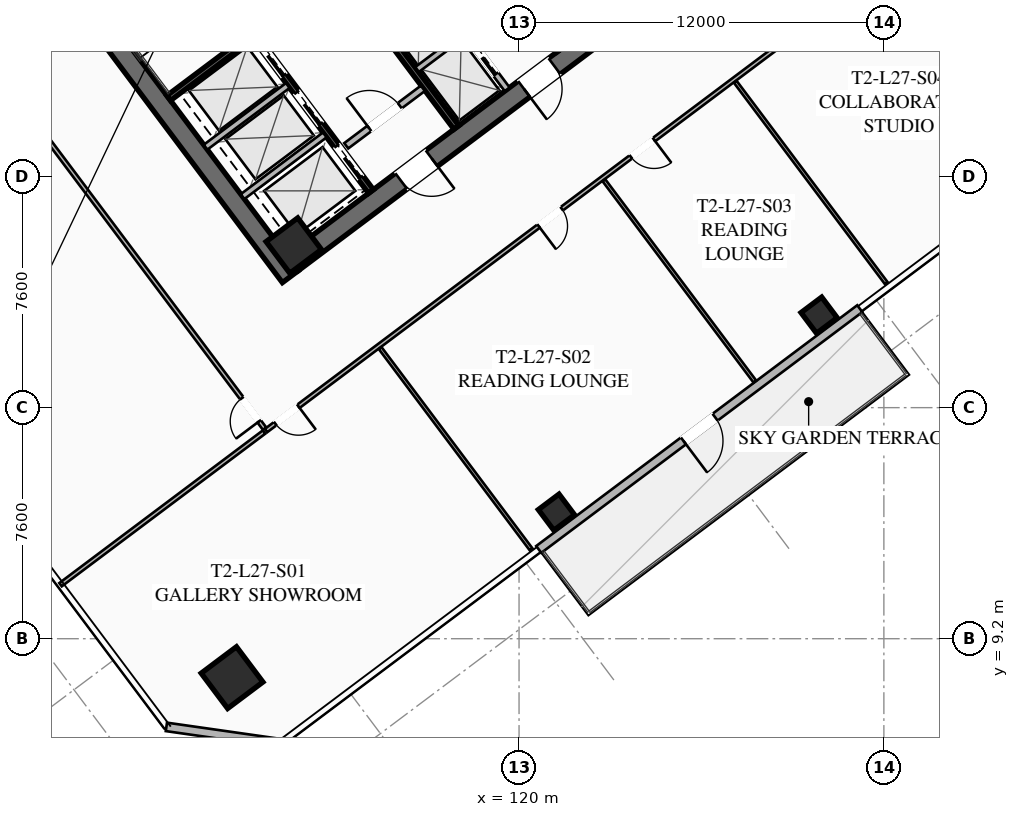
"""IFC4 building model, lengths in metres.
Left out: names, types, materials, properties, quantities, classifications, styles, units other than length and angle.
Written with IfcOpenShell. Run it as: python <this file> out.ifc"""

import sys

from ifc_helpers import new_model, si_unit, direction, frame, frame_2d, origin, origin_2d, place, context, subcontext, project, spatial, rectangle, hollow_rectangle, extrude, element, fill, save


model = new_model("IFC4")
c1 = context("Model", 3, precision=1e-05, world=origin(), true_north=direction((0.0, 1.0)))
c2 = subcontext(c1, "Body", "Model", "MODEL_VIEW")
j1 = project(units=[si_unit("LENGTHUNIT", "METRE"), si_unit("PLANEANGLEUNIT", "RADIAN")], contexts=[c1])
p1 = place(None, origin())
s1 = spatial("IfcSite", under=j1, at=p1, CompositionType="ELEMENT")
p2 = place(p1, origin())
s2 = spatial("IfcBuilding", under=s1, at=p2, CompositionType="ELEMENT")
p3 = place(p2, frame((0.0, 0.0, 102.7)))
s3 = spatial("IfcBuildingStorey", under=s2, at=p3, CompositionType="ELEMENT", Elevation=102.7)
p4 = place(p3, frame((112.476, 21.107, 0.0), z_axis=(0.0, 0.0, 1.0), x_axis=(-0.600005007985, 0.799996243986, 0.0)))
e1 = element("IfcWall", 1, at=p4, inside=s3, PredefinedType="SHEAR", context=c2, shape_type="SweptSolid", body=[
    extrude(rectangle(XDim=15.6, YDim=0.65, at=frame_2d((7.8, 0.0))), origin(), (0.0, 0.0, 1.0), 3.55),
])
p5 = place(p3, frame((124.429, 30.478, 0.0), z_axis=(0.0, 0.0, 1.0), x_axis=(-0.799998028465, -0.600002628705, 0.0)))
e2 = element("IfcWall", 2, at=p5, inside=s3, PredefinedType="SHEAR", context=c2, shape_type="SweptSolid", body=[
    extrude(rectangle(XDim=14.86, YDim=0.65, at=frame_2d((7.43, 0.0))), origin(), (0.0, 0.0, 1.0), 3.55),
])
p6 = place(p5, frame((9.13, 0.0, 0.0)))
e3 = element("IfcOpeningElement", 3, at=p6, cuts=e2, PredefinedType="OPENING", context=c2, shape_type="SweptSolid", body=[
    extrude(rectangle(XDim=1.25, YDim=2.25, at=frame_2d((0.625, 1.125))), frame((0.0, 0.335, 0.0), z_axis=(0.0, -1.0, 0.0), x_axis=(1.0, 0.0, 0.0)), (0.0, 0.0, 1.0), 0.67),
])
p7 = place(p5, frame((4.08, 0.0, 0.0)))
e4 = element("IfcOpeningElement", 4, at=p7, cuts=e2, PredefinedType="OPENING", context=c2, shape_type="SweptSolid", body=[
    extrude(rectangle(XDim=1.25, YDim=2.25, at=frame_2d((0.625, 1.125))), frame((0.0, 0.335, 0.0), z_axis=(0.0, -1.0, 0.0), x_axis=(1.0, 0.0, 0.0)), (0.0, 0.0, 1.0), 0.67),
])
p8 = place(p3, frame((112.59, 22.13, 0.0), z_axis=(0.0, 0.0, 1.0), x_axis=(0.799999996291, 0.600000004945, 0.0)))
e5 = element("IfcColumn", 5, at=p8, inside=s3, PredefinedType="COLUMN", context=c2, shape_type="SweptSolid", body=[
    extrude(hollow_rectangle(XDim=1.3, YDim=1.3, WallThickness=0.05, at=origin_2d()), origin(), (0.0, 0.0, 1.0), 3.35),
])
p9 = place(p3, frame((110.56, 7.92, 0.0), z_axis=(0.0, 0.0, 1.0), x_axis=(0.799999996291, 0.600000004945, 0.0)))
e6 = element("IfcColumn", 6, at=p9, inside=s3, PredefinedType="COLUMN", context=c2, shape_type="SweptSolid", body=[
    extrude(hollow_rectangle(XDim=1.45, YDim=1.45, WallThickness=0.055, at=origin_2d()), origin(), (0.0, 0.0, 1.0), 3.35),
])
for number, where, z_axis, x_axis in (
    (7, (121.23, 13.36, 0.0), (0.0, 0.0, 1.0), (0.8, 0.6, 0.0)),
    (8, (129.87, 19.84, 0.0), (0.0, 0.0, 1.0), (0.8, 0.6, 0.0)),
):
    element("IfcColumn", number, at=place(p3, frame(where, z_axis=z_axis, x_axis=x_axis)), inside=s3, PredefinedType="COLUMN", context=c2, shape_type="SweptSolid", body=[
        extrude(hollow_rectangle(XDim=0.85, YDim=0.85, WallThickness=0.035, at=origin_2d()), origin(), (0.0, 0.0, 1.0), 3.35),
    ])
p10 = place(p3, frame((131.208, 20.056, 0.0), z_axis=(0.0, 0.0, 1.0), x_axis=(-0.800004438899, -0.599994081423, 0.0)))
e9 = element("IfcWall", 9, at=p10, inside=s3, PredefinedType="SOLIDWALL", context=c2, shape_type="SweptSolid", body=[
    extrude(rectangle(XDim=13.2, YDim=0.28, at=frame_2d((6.6, 0.0))), origin(), (0.0, 0.0, 1.0), 3.35),
])
p11 = place(p10, frame((5.95, 0.0, 0.0)))
e10 = element("IfcOpeningElement", 10, at=p11, cuts=e9, PredefinedType="OPENING", context=c2, shape_type="SweptSolid", body=[
    extrude(rectangle(XDim=1.3, YDim=2.15, at=frame_2d((0.65, 1.075))), frame((0.0, 0.15, 0.0), z_axis=(0.0, -1.0, 0.0), x_axis=(1.0, 0.0, 0.0)), (0.0, 0.0, 1.0), 0.3),
])
p12 = place(p3, frame((112.18, 5.76, 0.0), z_axis=(0.0, 0.0, 1.0), x_axis=(-0.989948214866, 0.141430307517, 0.0)))
e11 = element("IfcWall", 11, at=p12, inside=s3, PredefinedType="SOLIDWALL", context=c2, shape_type="SweptSolid", body=[
    extrude(rectangle(XDim=3.818, YDim=0.28, at=frame_2d((1.909, 0.0))), origin(), (0.0, 0.0, 1.0), 3.35),
])
p13 = place(p3, frame((108.476, 26.982, 0.0), z_axis=(0.0, 0.0, 1.0), x_axis=(0.799984290658, 0.600020945218, 0.0)))
e12 = element("IfcWall", 12, at=p13, inside=s3, PredefinedType="SHEAR", context=c2, shape_type="SweptSolid", body=[
    extrude(rectangle(XDim=3.73, YDim=0.2, at=frame_2d((1.865, 0.0))), origin(), (0.0, 0.0, 1.0), 3.35),
])
p14 = place(p3, frame((117.938, 26.016, 0.0), z_axis=(0.0, 0.0, 1.0), x_axis=(-0.600005463273, 0.799995902516, 0.0)))
e13 = element("IfcWall", 13, at=p14, inside=s3, PredefinedType="SHEAR", context=c2, shape_type="SweptSolid", body=[
    extrude(rectangle(XDim=14.3, YDim=0.2, at=frame_2d((7.15, 0.0))), origin(), (0.0, 0.0, 1.0), 3.35),
])
p15 = place(p3, frame((114.316, 25.412, 0.0), z_axis=(0.0, 0.0, 1.0), x_axis=(0.800018601094, 0.59997519774, 0.0)))
e14 = element("IfcWall", 14, at=p15, inside=s3, PredefinedType="SOLIDWALL", context=c2, shape_type="SweptSolid", body=[
    extrude(rectangle(XDim=3.15, YDim=0.22, at=frame_2d((1.575, 0.0))), origin(), (0.0, 0.0, 1.0), 2.703),
])
p16 = place(p15, frame((0.95, 0.0, 0.0)))
e15 = element("IfcOpeningElement", 15, at=p16, cuts=e14, PredefinedType="OPENING", context=c2, shape_type="SweptSolid", body=[
    extrude(rectangle(XDim=1.25, YDim=2.25, at=frame_2d((0.625, 1.125))), frame((0.0, 0.12, 0.0), z_axis=(0.0, -1.0, 0.0), x_axis=(1.0, 0.0, 0.0)), (0.0, 0.0, 1.0), 0.24),
])
p17 = place(p3, frame((115.13, 23.91, 0.0), z_axis=(0.0, 0.0, 1.0), x_axis=(-0.599975393228, 0.800018454488, 0.0)))
e16 = element("IfcWall", 16, at=p17, inside=s3, PredefinedType="SHEAR", context=c2, shape_type="SweptSolid", body=[
    extrude(rectangle(XDim=6.35, YDim=0.2, at=frame_2d((3.175, 0.0))), origin(), (0.0, 0.0, 1.0), 3.35),
])
p18 = place(p17, frame((4.775, 0.0, 0.0)))
e17 = element("IfcOpeningElement", 17, at=p18, cuts=e16, PredefinedType="OPENING", context=c2, shape_type="SweptSolid", body=[
    extrude(rectangle(XDim=1.3, YDim=2.25, at=frame_2d((0.65, 1.125))), frame((0.0, 0.11, 0.0), z_axis=(0.0, -1.0, 0.0), x_axis=(1.0, 0.0, 0.0)), (0.0, 0.0, 1.0), 0.22),
])
p19 = place(p17, frame((2.775, 0.0, 0.0)))
e18 = element("IfcOpeningElement", 18, at=p19, cuts=e16, PredefinedType="OPENING", context=c2, shape_type="SweptSolid", body=[
    extrude(rectangle(XDim=1.3, YDim=2.25, at=frame_2d((0.65, 1.125))), frame((0.0, 0.11, 0.0), z_axis=(0.0, -1.0, 0.0), x_axis=(1.0, 0.0, 0.0)), (0.0, 0.0, 1.0), 0.22),
])
p20 = place(p17, frame((0.575, 0.0, 0.0)))
e19 = element("IfcOpeningElement", 19, at=p20, cuts=e16, PredefinedType="OPENING", context=c2, shape_type="SweptSolid", body=[
    extrude(rectangle(XDim=1.3, YDim=2.25, at=frame_2d((0.65, 1.125))), frame((0.0, 0.11, 0.0), z_axis=(0.0, -1.0, 0.0), x_axis=(1.0, 0.0, 0.0)), (0.0, 0.0, 1.0), 0.22),
])
for number, where, z_axis, x_axis in (
    (20, (110.906, 23.742, 0.0), (0.0, 0.0, 1.0), (0.8, 0.6, 0.0)),
    (21, (109.688, 25.366, 0.0), (0.0, 0.0, 1.0), (0.8, 0.6, 0.0)),
):
    element("IfcWall", number, at=place(p3, frame(where, z_axis=z_axis, x_axis=x_axis)), inside=s3, PredefinedType="SOLIDWALL", context=c2, shape_type="SweptSolid", body=[
        extrude(rectangle(XDim=3.38, YDim=0.2, at=frame_2d((1.69, 0.0))), origin(), (0.0, 0.0, 1.0), 3.35),
    ])
p21 = place(p3, frame((119.61, 27.27, 0.0), z_axis=(0.0, 0.0, 1.0), x_axis=(-0.600011488909, 0.79999138319, 0.0)))
e22 = element("IfcWall", 22, at=p21, inside=s3, PredefinedType="SOLIDWALL", context=c2, shape_type="SweptSolid", body=[
    extrude(rectangle(XDim=6.8, YDim=0.2, at=frame_2d((3.4, 0.0))), origin(), (0.0, 0.0, 1.0), 3.35),
])
p22 = place(p21, frame((0.625, 0.0, 0.0)))
e23 = element("IfcOpeningElement", 23, at=p22, cuts=e22, PredefinedType="OPENING", context=c2, shape_type="SweptSolid", body=[
    extrude(rectangle(XDim=1.1, YDim=2.2, at=frame_2d((0.55, 1.1))), frame((0.0, 0.11, 0.0), z_axis=(0.0, -1.0, 0.0), x_axis=(1.0, 0.0, 0.0)), (0.0, 0.0, 1.0), 0.22),
])
p23 = place(p21, frame((2.875, 0.0, 0.0)))
e24 = element("IfcOpeningElement", 24, at=p23, cuts=e22, PredefinedType="OPENING", context=c2, shape_type="SweptSolid", body=[
    extrude(rectangle(XDim=1.1, YDim=2.2, at=frame_2d((0.55, 1.1))), frame((0.0, 0.11, 0.0), z_axis=(0.0, -1.0, 0.0), x_axis=(1.0, 0.0, 0.0)), (0.0, 0.0, 1.0), 0.22),
])
p24 = place(p21, frame((5.125, 0.0, 0.0)))
e25 = element("IfcOpeningElement", 25, at=p24, cuts=e22, PredefinedType="OPENING", context=c2, shape_type="SweptSolid", body=[
    extrude(rectangle(XDim=1.1, YDim=2.2, at=frame_2d((0.55, 1.1))), frame((0.0, 0.11, 0.0), z_axis=(0.0, -1.0, 0.0), x_axis=(1.0, 0.0, 0.0)), (0.0, 0.0, 1.0), 0.22),
])
p25 = place(p3, frame((116.646, 27.922, 0.0), z_axis=(0.0, 0.0, 1.0), x_axis=(0.8, 0.6, 0.0)))
e26 = element("IfcWall", 26, at=p25, inside=s3, PredefinedType="SOLIDWALL", context=c2, shape_type="SweptSolid", body=[
    extrude(rectangle(XDim=1.88, YDim=0.2, at=frame_2d((0.94, 0.0))), origin(), (0.0, 0.0, 1.0), 3.35),
])
p26 = place(p3, frame((134.462, 33.134, 0.0), z_axis=(0.0, 0.0, 1.0), x_axis=(-0.799996913945, -0.600004114717, 0.0)))
e27 = element("IfcWall", 27, at=p26, inside=s3, PredefinedType="PARTITIONING", context=c2, shape_type="SweptSolid", body=[
    extrude(rectangle(XDim=28.48, YDim=0.135, at=frame_2d((14.24, 0.0))), origin(), (0.0, 0.0, 1.0), 2.703),
])
p27 = place(p26, frame((27.15, 0.0, 0.0)))
e28 = element("IfcOpeningElement", 28, at=p27, cuts=e27, PredefinedType="OPENING", context=c2, shape_type="SweptSolid", body=[
    extrude(rectangle(XDim=0.95, YDim=2.05, at=frame_2d((0.475, 1.025))), frame((0.0, 0.077, 0.0), z_axis=(0.0, -1.0, 0.0), x_axis=(1.0, 0.0, 0.0)), (0.0, 0.0, 1.0), 0.155),
])
p28 = place(p26, frame((16.321, 0.0, 0.0)))
e29 = element("IfcOpeningElement", 29, at=p28, cuts=e27, PredefinedType="OPENING", context=c2, shape_type="SweptSolid", body=[
    extrude(rectangle(XDim=0.95, YDim=2.05, at=frame_2d((0.475, 1.025))), frame((0.0, 0.077, 0.0), z_axis=(0.0, -1.0, 0.0), x_axis=(1.0, 0.0, 0.0)), (0.0, 0.0, 1.0), 0.155),
])
p29 = place(p26, frame((12.529, 0.0, 0.0)))
e30 = element("IfcOpeningElement", 30, at=p29, cuts=e27, PredefinedType="OPENING", context=c2, shape_type="SweptSolid", body=[
    extrude(rectangle(XDim=0.95, YDim=2.05, at=frame_2d((0.475, 1.025))), frame((0.0, 0.077, 0.0), z_axis=(0.0, -1.0, 0.0), x_axis=(1.0, 0.0, 0.0)), (0.0, 0.0, 1.0), 0.155),
])
p30 = place(p26, frame((0.38, 0.0, 0.0)))
e31 = element("IfcOpeningElement", 31, at=p30, cuts=e27, PredefinedType="OPENING", context=c2, shape_type="SweptSolid", body=[
    extrude(rectangle(XDim=0.95, YDim=2.05, at=frame_2d((0.475, 1.025))), frame((0.0, 0.077, 0.0), z_axis=(0.0, -1.0, 0.0), x_axis=(1.0, 0.0, 0.0)), (0.0, 0.0, 1.0), 0.155),
])
for number, where, z_axis, x_axis in (
    (32, (120.398, 12.136, 0.0), (0.0, 0.0, 1.0), (-0.6, 0.8, 0.0)),
    (33, (127.758, 17.656, 0.0), (0.0, 0.0, 1.0), (-0.6, 0.8, 0.0)),
):
    element("IfcWall", number, at=place(p3, frame(where, z_axis=z_axis, x_axis=x_axis)), inside=s3, PredefinedType="PARTITIONING", context=c2, shape_type="SweptSolid", body=[
        extrude(rectangle(XDim=8.28, YDim=0.11, at=frame_2d((4.14, 0.0))), origin(), (0.0, 0.0, 1.0), 2.703),
    ])
p31 = place(p3, frame((132.078, 20.896, 0.0), z_axis=(0.0, 0.0, 1.0), x_axis=(-0.599981128793, 0.800014153057, 0.0)))
e34 = element("IfcWall", 34, at=p31, inside=s3, PredefinedType="PARTITIONING", context=c2, shape_type="SweptSolid", body=[
    extrude(rectangle(XDim=8.28, YDim=0.11, at=frame_2d((4.14, 0.0))), origin(), (0.0, 0.0, 1.0), 2.703),
])
p32 = place(p3, frame((111.63, 16.11, 0.0), z_axis=(0.0, 0.0, 1.0), x_axis=(-0.599996466511, 0.800002650104, 0.0)))
e35 = element("IfcWall", 35, at=p32, inside=s3, PredefinedType="PARTITIONING", context=c2, shape_type="SweptSolid", body=[
    extrude(rectangle(XDim=22.11, YDim=0.135, at=frame_2d((11.055, 0.0))), origin(), (0.0, 0.0, 1.0), 2.703),
])
p33 = place(p32, frame((0.3, 0.0, 0.0)))
e36 = element("IfcOpeningElement", 36, at=p33, cuts=e35, PredefinedType="OPENING", context=c2, shape_type="SweptSolid", body=[
    extrude(rectangle(XDim=0.95, YDim=2.05, at=frame_2d((0.475, 1.025))), frame((0.0, 0.077, 0.0), z_axis=(0.0, -1.0, 0.0), x_axis=(1.0, 0.0, 0.0)), (0.0, 0.0, 1.0), 0.155),
])
p34 = place(p3, frame((104.918, 10.976, 0.0), z_axis=(0.0, 0.0, 1.0), x_axis=(0.800003500202, 0.599995333035, 0.0)))
e37 = element("IfcWall", 37, at=p34, inside=s3, PredefinedType="PARTITIONING", context=c2, shape_type="SweptSolid", body=[
    extrude(rectangle(XDim=8.37, YDim=0.135, at=frame_2d((4.185, 0.0))), origin(), (0.0, 0.0, 1.0), 2.703),
])
p35 = place(p11, origin())
e38 = element("IfcDoor", 38, at=p35, inside=s3, OperationType="SINGLE_SWING_RIGHT", PredefinedType="DOOR", context=c2, shape_type="SweptSolid", body=[
    extrude(rectangle(XDim=1.3, YDim=2.15, at=frame_2d((0.65, 1.075))), frame((0.0, 0.025, 0.0), z_axis=(0.0, -1.0, 0.0), x_axis=(1.0, 0.0, 0.0)), (0.0, 0.0, 1.0), 0.05),
])
fill(e10, e38)
p36 = place(p6, origin())
e39 = element("IfcDoor", 39, at=p36, inside=s3, OperationType="SINGLE_SWING_LEFT", PredefinedType="DOOR", context=c2, shape_type="SweptSolid", body=[
    extrude(rectangle(XDim=1.25, YDim=2.25, at=frame_2d((0.625, 1.125))), frame((0.0, 0.025, 0.0), z_axis=(0.0, -1.0, 0.0), x_axis=(1.0, 0.0, 0.0)), (0.0, 0.0, 1.0), 0.05),
])
fill(e3, e39)
p37 = place(p7, origin())
e40 = element("IfcDoor", 40, at=p37, inside=s3, OperationType="SINGLE_SWING_RIGHT", PredefinedType="DOOR", context=c2, shape_type="SweptSolid", body=[
    extrude(rectangle(XDim=1.25, YDim=2.25, at=frame_2d((0.625, 1.125))), frame((0.0, 0.025, 0.0), z_axis=(0.0, -1.0, 0.0), x_axis=(1.0, 0.0, 0.0)), (0.0, 0.0, 1.0), 0.05),
])
fill(e4, e40)
p38 = place(p16, origin())
e41 = element("IfcDoor", 41, at=p38, inside=s3, OperationType="SINGLE_SWING_LEFT", PredefinedType="DOOR", context=c2, shape_type="SweptSolid", body=[
    extrude(rectangle(XDim=1.25, YDim=2.25, at=frame_2d((0.625, 1.125))), frame((0.0, 0.025, 0.0), z_axis=(0.0, -1.0, 0.0), x_axis=(1.0, 0.0, 0.0)), (0.0, 0.0, 1.0), 0.05),
])
fill(e15, e41)
p39 = place(p27, origin())
e42 = element("IfcDoor", 42, at=p39, inside=s3, OperationType="SINGLE_SWING_LEFT", PredefinedType="DOOR", context=c2, shape_type="SweptSolid", body=[
    extrude(rectangle(XDim=0.95, YDim=2.05, at=frame_2d((0.475, 1.025))), frame((0.0, 0.025, 0.0), z_axis=(0.0, -1.0, 0.0), x_axis=(1.0, 0.0, 0.0)), (0.0, 0.0, 1.0), 0.05),
])
fill(e28, e42)
p40 = place(p28, origin())
e43 = element("IfcDoor", 43, at=p40, inside=s3, OperationType="SINGLE_SWING_RIGHT", PredefinedType="DOOR", context=c2, shape_type="SweptSolid", body=[
    extrude(rectangle(XDim=0.95, YDim=2.05, at=frame_2d((0.475, 1.025))), frame((0.0, 0.025, 0.0), z_axis=(0.0, -1.0, 0.0), x_axis=(1.0, 0.0, 0.0)), (0.0, 0.0, 1.0), 0.05),
])
fill(e29, e43)
p41 = place(p29, origin())
e44 = element("IfcDoor", 44, at=p41, inside=s3, OperationType="SINGLE_SWING_LEFT", PredefinedType="DOOR", context=c2, shape_type="SweptSolid", body=[
    extrude(rectangle(XDim=0.95, YDim=2.05, at=frame_2d((0.475, 1.025))), frame((0.0, 0.025, 0.0), z_axis=(0.0, -1.0, 0.0), x_axis=(1.0, 0.0, 0.0)), (0.0, 0.0, 1.0), 0.05),
])
fill(e30, e44)
p42 = place(p33, origin())
e45 = element("IfcDoor", 45, at=p42, inside=s3, OperationType="SINGLE_SWING_LEFT", PredefinedType="DOOR", context=c2, shape_type="SweptSolid", body=[
    extrude(rectangle(XDim=0.95, YDim=2.05, at=frame_2d((0.475, 1.025))), frame((0.0, 0.025, 0.0), z_axis=(0.0, -1.0, 0.0), x_axis=(1.0, 0.0, 0.0)), (0.0, 0.0, 1.0), 0.05),
])
fill(e36, e45)
p43 = place(p18, origin())
e46 = element("IfcDoor", 46, at=p43, inside=s3, OperationType="SLIDING_TO_LEFT", PredefinedType="DOOR", context=c2, shape_type="SweptSolid", body=[
    extrude(rectangle(XDim=1.3, YDim=2.25, at=frame_2d((0.65, 1.125))), frame((0.0, 0.025, 0.0), z_axis=(0.0, -1.0, 0.0), x_axis=(1.0, 0.0, 0.0)), (0.0, 0.0, 1.0), 0.05),
])
fill(e17, e46)
p44 = place(p19, origin())
e47 = element("IfcDoor", 47, at=p44, inside=s3, OperationType="SLIDING_TO_LEFT", PredefinedType="DOOR", context=c2, shape_type="SweptSolid", body=[
    extrude(rectangle(XDim=1.3, YDim=2.25, at=frame_2d((0.65, 1.125))), frame((0.0, 0.025, 0.0), z_axis=(0.0, -1.0, 0.0), x_axis=(1.0, 0.0, 0.0)), (0.0, 0.0, 1.0), 0.05),
])
fill(e18, e47)
p45 = place(p20, origin())
e48 = element("IfcDoor", 48, at=p45, inside=s3, OperationType="SLIDING_TO_LEFT", PredefinedType="DOOR", context=c2, shape_type="SweptSolid", body=[
    extrude(rectangle(XDim=1.3, YDim=2.25, at=frame_2d((0.65, 1.125))), frame((0.0, 0.025, 0.0), z_axis=(0.0, -1.0, 0.0), x_axis=(1.0, 0.0, 0.0)), (0.0, 0.0, 1.0), 0.05),
])
fill(e19, e48)
p46 = place(p22, origin())
e49 = element("IfcDoor", 49, at=p46, inside=s3, OperationType="SLIDING_TO_LEFT", PredefinedType="DOOR", context=c2, shape_type="SweptSolid", body=[
    extrude(rectangle(XDim=1.1, YDim=2.2, at=frame_2d((0.55, 1.1))), frame((0.0, 0.025, 0.0), z_axis=(0.0, -1.0, 0.0), x_axis=(1.0, 0.0, 0.0)), (0.0, 0.0, 1.0), 0.05),
])
fill(e23, e49)
save(model, sys.argv[1])
